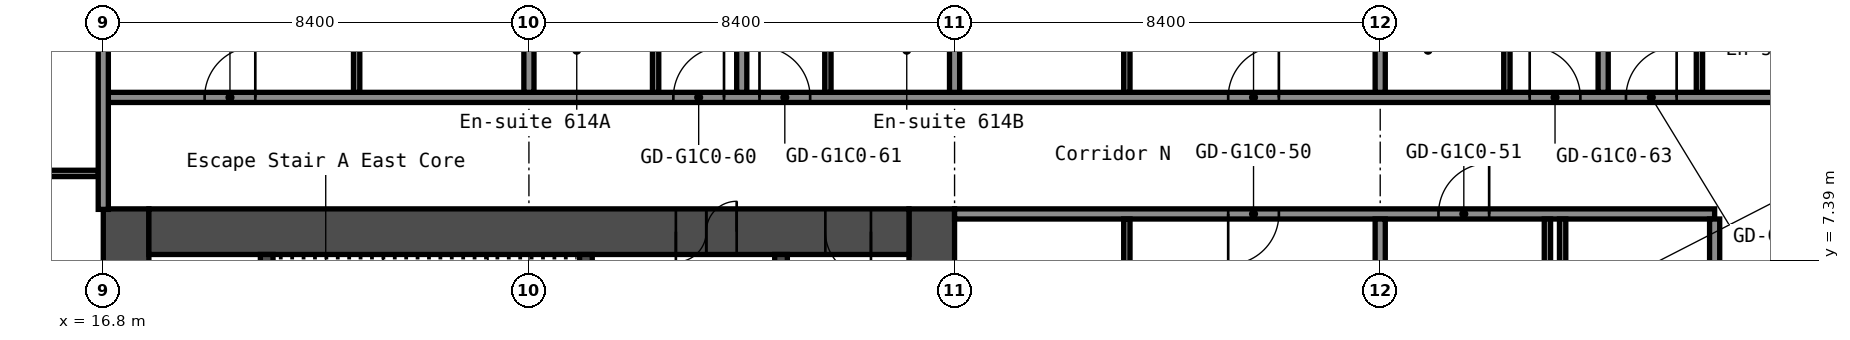
"""IFC4 building model, lengths in metres.
Left out: names, types, materials, properties, quantities, classifications, styles, units other than length and angle.
Written with IfcOpenShell. Run it as: python <this file> out.ifc"""

import sys

from ifc_helpers import new_model, si_unit, direction, frame, frame_2d, origin, place, context, subcontext, project, spatial, rectangle, extrude, element, fill, save


model = new_model("IFC4")
c1 = context("Model", 3, precision=1e-05, world=origin(), true_north=direction((0.0, 1.0)))
c2 = subcontext(c1, "Body", "Model", "MODEL_VIEW")
j1 = project(units=[si_unit("LENGTHUNIT", "METRE"), si_unit("PLANEANGLEUNIT", "RADIAN")], contexts=[c1])
p1 = place(None, origin())
s1 = spatial("IfcSite", under=j1, at=p1, CompositionType="ELEMENT")
p2 = place(p1, origin())
s2 = spatial("IfcBuilding", under=s1, at=p2, CompositionType="ELEMENT")
p3 = place(p2, frame((0.0, 0.0, 26.2)))
s3 = spatial("IfcBuildingStorey", under=s2, at=p3, CompositionType="ELEMENT", Elevation=26.2)
p4 = place(p3, frame((17.25, -8.4, 0.0), z_axis=(0.0, 0.0, 1.0), x_axis=(0.0, 1.0, 0.0)))
e1 = element("IfcWall", 1, at=p4, inside=s3, PredefinedType="SHEAR", context=c2, shape_type="SweptSolid", body=[
    extrude(rectangle(XDim=16.8, YDim=0.9, at=frame_2d((8.4, 0.0))), origin(), (0.0, 0.0, 1.0), 2.8),
])
p5 = place(p4, frame((12.75, 0.0, 0.0)))
e2 = element("IfcOpeningElement", 2, at=p5, cuts=e1, PredefinedType="OPENING", context=c2, shape_type="SweptSolid", body=[
    extrude(rectangle(XDim=1.2, YDim=2.1, at=frame_2d((0.6, 1.05))), frame((0.0, 0.46, 0.0), z_axis=(0.0, -1.0, 0.0), x_axis=(1.0, 0.0, 0.0)), (0.0, 0.0, 1.0), 0.92),
])
p6 = place(p4, frame((2.85, 0.0, 0.0)))
e3 = element("IfcOpeningElement", 3, at=p6, cuts=e1, PredefinedType="OPENING", context=c2, shape_type="SweptSolid", body=[
    extrude(rectangle(XDim=1.2, YDim=2.1, at=frame_2d((0.6, 1.05))), frame((0.0, 0.46, 0.0), z_axis=(0.0, -1.0, 0.0), x_axis=(1.0, 0.0, 0.0)), (0.0, 0.0, 1.0), 0.92),
])
p7 = place(p3, frame((33.15, -8.4, 0.0), z_axis=(0.0, 0.0, 1.0), x_axis=(0.0, 1.0, 0.0)))
e4 = element("IfcWall", 4, at=p7, inside=s3, PredefinedType="SHEAR", context=c2, shape_type="SweptSolid", body=[
    extrude(rectangle(XDim=16.8, YDim=0.9, at=frame_2d((8.4, 0.0))), origin(), (0.0, 0.0, 1.0), 2.8),
])
p8 = place(p3, frame((17.7, 7.95, 0.0), z_axis=(0.0, 0.0, 1.0), x_axis=(1.0, 0.0, 0.0)))
e5 = element("IfcWall", 5, at=p8, inside=s3, PredefinedType="SHEAR", context=c2, shape_type="SweptSolid", body=[
    extrude(rectangle(XDim=15.0, YDim=0.9, at=frame_2d((7.5, 0.0))), origin(), (0.0, 0.0, 1.0), 2.8),
])
p9 = place(p8, frame((10.4, 0.0, 0.0)))
e6 = element("IfcOpeningElement", 6, at=p9, cuts=e5, PredefinedType="OPENING", context=c2, shape_type="SweptSolid", body=[
    extrude(rectangle(XDim=1.2, YDim=2.1, at=frame_2d((0.6, 1.05))), frame((0.0, 0.46, 0.0), z_axis=(0.0, -1.0, 0.0), x_axis=(1.0, 0.0, 0.0)), (0.0, 0.0, 1.0), 0.92),
])
p10 = place(p8, frame((13.35, 0.0, 0.0)))
e7 = element("IfcOpeningElement", 7, at=p10, cuts=e5, PredefinedType="OPENING", context=c2, shape_type="SweptSolid", body=[
    extrude(rectangle(XDim=0.9, YDim=2.1, at=frame_2d((0.45, 1.05))), frame((0.0, 0.46, 0.0), z_axis=(0.0, -1.0, 0.0), x_axis=(1.0, 0.0, 0.0)), (0.0, 0.0, 1.0), 0.92),
])
p11 = place(p3, frame((20.025, 1.2, 0.0), z_axis=(0.0, 0.0, 1.0), x_axis=(0.0, 1.0, 0.0)))
e8 = element("IfcWall", 8, at=p11, inside=s3, PredefinedType="SHEAR", context=c2, shape_type="SweptSolid", body=[
    extrude(rectangle(XDim=6.3, YDim=0.25, at=frame_2d((3.15, 0.0))), origin(), (0.0, 0.0, 1.0), 2.8),
])
p12 = place(p3, frame((26.325, 3.75, 0.0), z_axis=(0.0, 0.0, 1.0), x_axis=(0.0, 1.0, 0.0)))
e9 = element("IfcWall", 9, at=p12, inside=s3, PredefinedType="SHEAR", context=c2, shape_type="SweptSolid", body=[
    extrude(rectangle(XDim=3.75, YDim=0.25, at=frame_2d((1.875, 0.0))), origin(), (0.0, 0.0, 1.0), 2.8),
])
p13 = place(p12, frame((1.25, 0.0, 0.0)))
e10 = element("IfcOpeningElement", 10, at=p13, cuts=e9, PredefinedType="OPENING", context=c2, shape_type="SweptSolid", body=[
    extrude(rectangle(XDim=1.2, YDim=2.1, at=frame_2d((0.6, 1.05))), frame((0.0, 0.135, 0.0), z_axis=(0.0, -1.0, 0.0), x_axis=(1.0, 0.0, 0.0)), (0.0, 0.0, 1.0), 0.27),
])
p14 = place(p3, frame((30.175, 1.45, 0.0), z_axis=(0.0, 0.0, 1.0), x_axis=(0.0, 1.0, 0.0)))
e11 = element("IfcWall", 11, at=p14, inside=s3, PredefinedType="SHEAR", context=c2, shape_type="SweptSolid", body=[
    extrude(rectangle(XDim=6.05, YDim=0.25, at=frame_2d((3.025, 0.0))), origin(), (0.0, 0.0, 1.0), 2.8),
])
p15 = place(p14, frame((2.625, 0.0, 0.0)))
e12 = element("IfcOpeningElement", 12, at=p15, cuts=e11, PredefinedType="OPENING", context=c2, shape_type="SweptSolid", body=[
    extrude(rectangle(XDim=1.1, YDim=2.1, at=frame_2d((0.55, 1.05))), frame((0.0, 0.135, 0.0), z_axis=(0.0, -1.0, 0.0), x_axis=(1.0, 0.0, 0.0)), (0.0, 0.0, 1.0), 0.27),
])
p16 = place(p3, frame((33.6, 8.3, 0.0), z_axis=(0.0, 0.0, 1.0), x_axis=(1.0, 0.0, 0.0)))
e13 = element("IfcWall", 13, at=p16, inside=s3, PredefinedType="PARTITIONING", context=c2, shape_type="SweptSolid", body=[
    extrude(rectangle(XDim=15.0, YDim=0.2, at=frame_2d((7.5, 0.0))), origin(), (0.0, 0.0, 1.0), 2.8),
])
p17 = place(p16, frame((5.4, 0.0, 0.0)))
e14 = element("IfcOpeningElement", 14, at=p17, cuts=e13, PredefinedType="OPENING", context=c2, shape_type="SweptSolid", body=[
    extrude(rectangle(XDim=1.0, YDim=2.1, at=frame_2d((0.5, 1.05))), frame((0.0, 0.11, 0.0), z_axis=(0.0, -1.0, 0.0), x_axis=(1.0, 0.0, 0.0)), (0.0, 0.0, 1.0), 0.22),
])
p18 = place(p16, frame((9.55, 0.0, 0.0)))
e15 = element("IfcOpeningElement", 15, at=p18, cuts=e13, PredefinedType="OPENING", context=c2, shape_type="SweptSolid", body=[
    extrude(rectangle(XDim=1.0, YDim=2.1, at=frame_2d((0.5, 1.05))), frame((0.0, 0.11, 0.0), z_axis=(0.0, -1.0, 0.0), x_axis=(1.0, 0.0, 0.0)), (0.0, 0.0, 1.0), 0.22),
])
p19 = place(p3, frame((14.363, 9.1, 0.0), z_axis=(0.0, 0.0, 1.0), x_axis=(1.0, 0.0, 0.0)))
e16 = element("IfcWall", 16, at=p19, inside=s3, PredefinedType="PARTITIONING", context=c2, shape_type="SweptSolid", body=[
    extrude(rectangle(XDim=2.337, YDim=0.125, at=frame_2d((1.169, 0.0))), origin(), (0.0, 0.0, 1.0), 2.8),
])
p20 = place(p3, frame((16.8, 10.6, 0.0), z_axis=(0.0, 0.0, 1.0), x_axis=(1.0, 0.0, 0.0)))
e17 = element("IfcWall", 17, at=p20, inside=s3, PredefinedType="PARTITIONING", context=c2, shape_type="SweptSolid", body=[
    extrude(rectangle(XDim=34.3, YDim=0.2, at=frame_2d((17.15, 0.0))), origin(), (0.0, 0.0, 1.0), 2.8),
])
p21 = place(p20, frame((2.0, 0.0, 0.0)))
e18 = element("IfcOpeningElement", 18, at=p21, cuts=e17, PredefinedType="OPENING", context=c2, shape_type="SweptSolid", body=[
    extrude(rectangle(XDim=1.0, YDim=2.1, at=frame_2d((0.5, 1.05))), frame((0.0, 0.11, 0.0), z_axis=(0.0, -1.0, 0.0), x_axis=(1.0, 0.0, 0.0)), (0.0, 0.0, 1.0), 0.22),
])
p22 = place(p20, frame((11.25, 0.0, 0.0)))
e19 = element("IfcOpeningElement", 19, at=p22, cuts=e17, PredefinedType="OPENING", context=c2, shape_type="SweptSolid", body=[
    extrude(rectangle(XDim=1.0, YDim=2.1, at=frame_2d((0.5, 1.05))), frame((0.0, 0.11, 0.0), z_axis=(0.0, -1.0, 0.0), x_axis=(1.0, 0.0, 0.0)), (0.0, 0.0, 1.0), 0.22),
])
p23 = place(p20, frame((12.95, 0.0, 0.0)))
e20 = element("IfcOpeningElement", 20, at=p23, cuts=e17, PredefinedType="OPENING", context=c2, shape_type="SweptSolid", body=[
    extrude(rectangle(XDim=1.0, YDim=2.1, at=frame_2d((0.5, 1.05))), frame((0.0, 0.11, 0.0), z_axis=(0.0, -1.0, 0.0), x_axis=(1.0, 0.0, 0.0)), (0.0, 0.0, 1.0), 0.22),
])
p24 = place(p20, frame((22.2, 0.0, 0.0)))
e21 = element("IfcOpeningElement", 21, at=p24, cuts=e17, PredefinedType="OPENING", context=c2, shape_type="SweptSolid", body=[
    extrude(rectangle(XDim=1.0, YDim=2.1, at=frame_2d((0.5, 1.05))), frame((0.0, 0.11, 0.0), z_axis=(0.0, -1.0, 0.0), x_axis=(1.0, 0.0, 0.0)), (0.0, 0.0, 1.0), 0.22),
])
p25 = place(p20, frame((28.15, 0.0, 0.0)))
e22 = element("IfcOpeningElement", 22, at=p25, cuts=e17, PredefinedType="OPENING", context=c2, shape_type="SweptSolid", body=[
    extrude(rectangle(XDim=1.0, YDim=2.1, at=frame_2d((0.5, 1.05))), frame((0.0, 0.11, 0.0), z_axis=(0.0, -1.0, 0.0), x_axis=(1.0, 0.0, 0.0)), (0.0, 0.0, 1.0), 0.22),
])
p26 = place(p20, frame((30.05, 0.0, 0.0)))
e23 = element("IfcOpeningElement", 23, at=p26, cuts=e17, PredefinedType="OPENING", context=c2, shape_type="SweptSolid", body=[
    extrude(rectangle(XDim=1.0, YDim=2.1, at=frame_2d((0.5, 1.05))), frame((0.0, 0.11, 0.0), z_axis=(0.0, -1.0, 0.0), x_axis=(1.0, 0.0, 0.0)), (0.0, 0.0, 1.0), 0.22),
])
p27 = place(p3, frame((16.8, 8.39, 0.0), z_axis=(0.0, 0.0, 1.0), x_axis=(0.0, 1.0, 0.0)))
e24 = element("IfcWall", 24, at=p27, inside=s3, PredefinedType="PARTITIONING", context=c2, shape_type="SweptSolid", body=[
    extrude(rectangle(XDim=11.91, YDim=0.2, at=frame_2d((5.955, 0.0))), origin(), (0.0, 0.0, 1.0), 2.8),
])
p28 = place(p3, frame((21.8, 10.7, 0.0), z_axis=(0.0, 0.0, 1.0), x_axis=(0.0, 1.0, 0.0)))
e25 = element("IfcWall", 25, at=p28, inside=s3, PredefinedType="PARTITIONING", context=c2, shape_type="SweptSolid", body=[
    extrude(rectangle(XDim=3.3, YDim=0.125, at=frame_2d((1.65, 0.0))), origin(), (0.0, 0.0, 1.0), 2.8),
])
p29 = place(p3, frame((25.2, 10.7, 0.0), z_axis=(0.0, 0.0, 1.0), x_axis=(0.0, 1.0, 0.0)))
e26 = element("IfcWall", 26, at=p29, inside=s3, PredefinedType="PARTITIONING", context=c2, shape_type="SweptSolid", body=[
    extrude(rectangle(XDim=9.6, YDim=0.2, at=frame_2d((4.8, 0.0))), origin(), (0.0, 0.0, 1.0), 2.8),
])
p30 = place(p3, frame((27.7, 10.7, 0.0), z_axis=(0.0, 0.0, 1.0), x_axis=(0.0, 1.0, 0.0)))
e27 = element("IfcWall", 27, at=p30, inside=s3, PredefinedType="PARTITIONING", context=c2, shape_type="SweptSolid", body=[
    extrude(rectangle(XDim=2.9, YDim=0.125, at=frame_2d((1.45, 0.0))), origin(), (0.0, 0.0, 1.0), 2.8),
])
p31 = place(p30, frame((1.5, 0.0, 0.0)))
e28 = element("IfcOpeningElement", 28, at=p31, cuts=e27, PredefinedType="OPENING", context=c2, shape_type="SweptSolid", body=[
    extrude(rectangle(XDim=0.8, YDim=2.1, at=frame_2d((0.4, 1.05))), frame((0.0, 0.073, 0.0), z_axis=(0.0, -1.0, 0.0), x_axis=(1.0, 0.0, 0.0)), (0.0, 0.0, 1.0), 0.145),
])
p32 = place(p3, frame((29.4, 10.7, 0.0), z_axis=(0.0, 0.0, 1.0), x_axis=(0.0, 1.0, 0.0)))
e29 = element("IfcWall", 29, at=p32, inside=s3, PredefinedType="PARTITIONING", context=c2, shape_type="SweptSolid", body=[
    extrude(rectangle(XDim=9.6, YDim=0.2, at=frame_2d((4.8, 0.0))), origin(), (0.0, 0.0, 1.0), 2.8),
])
p33 = place(p3, frame((31.1, 10.7, 0.0), z_axis=(0.0, 0.0, 1.0), x_axis=(0.0, 1.0, 0.0)))
e30 = element("IfcWall", 30, at=p33, inside=s3, PredefinedType="PARTITIONING", context=c2, shape_type="SweptSolid", body=[
    extrude(rectangle(XDim=2.9, YDim=0.125, at=frame_2d((1.45, 0.0))), origin(), (0.0, 0.0, 1.0), 2.8),
])
p34 = place(p33, frame((1.5, 0.0, 0.0)))
e31 = element("IfcOpeningElement", 31, at=p34, cuts=e30, PredefinedType="OPENING", context=c2, shape_type="SweptSolid", body=[
    extrude(rectangle(XDim=0.8, YDim=2.1, at=frame_2d((0.4, 1.05))), frame((0.0, 0.073, 0.0), z_axis=(0.0, -1.0, 0.0), x_axis=(1.0, 0.0, 0.0)), (0.0, 0.0, 1.0), 0.145),
])
p35 = place(p3, frame((33.6, 10.7, 0.0), z_axis=(0.0, 0.0, 1.0), x_axis=(0.0, 1.0, 0.0)))
e32 = element("IfcWall", 32, at=p35, inside=s3, PredefinedType="PARTITIONING", context=c2, shape_type="SweptSolid", body=[
    extrude(rectangle(XDim=9.6, YDim=0.2, at=frame_2d((4.8, 0.0))), origin(), (0.0, 0.0, 1.0), 2.8),
])
for number, where, z_axis, x_axis in (
    (33, (37.0, 4.9, 0.0), (0.0, 0.0, 1.0), (0.0, 1.0, 0.0)),
    (34, (37.0, 10.7, 0.0), (0.0, 0.0, 1.0), (0.0, 1.0, 0.0)),
):
    element("IfcWall", number, at=place(p3, frame(where, z_axis=z_axis, x_axis=x_axis)), inside=s3, PredefinedType="PARTITIONING", context=c2, shape_type="SweptSolid", body=[
        extrude(rectangle(XDim=3.3, YDim=0.125, at=frame_2d((1.65, 0.0))), origin(), (0.0, 0.0, 1.0), 2.8),
    ])
p36 = place(p3, frame((42.0, -8.2, 0.0), z_axis=(0.0, 0.0, 1.0), x_axis=(0.0, 1.0, 0.0)))
e35 = element("IfcWall", 35, at=p36, inside=s3, PredefinedType="PARTITIONING", context=c2, shape_type="SweptSolid", body=[
    extrude(rectangle(XDim=16.4, YDim=0.2, at=frame_2d((8.2, 0.0))), origin(), (0.0, 0.0, 1.0), 2.8),
])
p37 = place(p3, frame((42.0, 10.7, 0.0), z_axis=(0.0, 0.0, 1.0), x_axis=(0.0, 1.0, 0.0)))
e36 = element("IfcWall", 36, at=p37, inside=s3, PredefinedType="PARTITIONING", context=c2, shape_type="SweptSolid", body=[
    extrude(rectangle(XDim=9.6, YDim=0.2, at=frame_2d((4.8, 0.0))), origin(), (0.0, 0.0, 1.0), 2.8),
])
p38 = place(p3, frame((44.5, 10.7, 0.0), z_axis=(0.0, 0.0, 1.0), x_axis=(0.0, 1.0, 0.0)))
e37 = element("IfcWall", 37, at=p38, inside=s3, PredefinedType="PARTITIONING", context=c2, shape_type="SweptSolid", body=[
    extrude(rectangle(XDim=2.9, YDim=0.125, at=frame_2d((1.45, 0.0))), origin(), (0.0, 0.0, 1.0), 2.8),
])
p39 = place(p38, frame((1.5, 0.0, 0.0)))
e38 = element("IfcOpeningElement", 38, at=p39, cuts=e37, PredefinedType="OPENING", context=c2, shape_type="SweptSolid", body=[
    extrude(rectangle(XDim=0.8, YDim=2.1, at=frame_2d((0.4, 1.05))), frame((0.0, 0.073, 0.0), z_axis=(0.0, -1.0, 0.0), x_axis=(1.0, 0.0, 0.0)), (0.0, 0.0, 1.0), 0.145),
])
p40 = place(p3, frame((45.3, -8.2, 0.0), z_axis=(0.0, 0.0, 1.0), x_axis=(0.0, 1.0, 0.0)))
e39 = element("IfcWall", 39, at=p40, inside=s3, PredefinedType="PARTITIONING", context=c2, shape_type="SweptSolid", body=[
    extrude(rectangle(XDim=16.4, YDim=0.125, at=frame_2d((8.2, 0.0))), origin(), (0.0, 0.0, 1.0), 2.8),
])
p41 = place(p40, frame((4.05, 0.0, 0.0)))
e40 = element("IfcOpeningElement", 40, at=p41, cuts=e39, PredefinedType="OPENING", context=c2, shape_type="SweptSolid", body=[
    extrude(rectangle(XDim=0.9, YDim=2.1, at=frame_2d((0.45, 1.05))), frame((0.0, 0.073, 0.0), z_axis=(0.0, -1.0, 0.0), x_axis=(1.0, 0.0, 0.0)), (0.0, 0.0, 1.0), 0.145),
])
p42 = place(p40, frame((11.45, 0.0, 0.0)))
e41 = element("IfcOpeningElement", 41, at=p42, cuts=e39, PredefinedType="OPENING", context=c2, shape_type="SweptSolid", body=[
    extrude(rectangle(XDim=0.9, YDim=2.1, at=frame_2d((0.45, 1.05))), frame((0.0, 0.073, 0.0), z_axis=(0.0, -1.0, 0.0), x_axis=(1.0, 0.0, 0.0)), (0.0, 0.0, 1.0), 0.145),
])
p43 = place(p3, frame((45.6, 5.1, 0.0), z_axis=(0.0, 0.0, 1.0), x_axis=(0.0, 1.0, 0.0)))
e42 = element("IfcWall", 42, at=p43, inside=s3, PredefinedType="PARTITIONING", context=c2, shape_type="SweptSolid", body=[
    extrude(rectangle(XDim=3.1, YDim=0.125, at=frame_2d((1.55, 0.0))), origin(), (0.0, 0.0, 1.0), 2.8),
])
p44 = place(p3, frame((46.4, 10.7, 0.0), z_axis=(0.0, 0.0, 1.0), x_axis=(0.0, 1.0, 0.0)))
e43 = element("IfcWall", 43, at=p44, inside=s3, PredefinedType="PARTITIONING", context=c2, shape_type="SweptSolid", body=[
    extrude(rectangle(XDim=9.6, YDim=0.2, at=frame_2d((4.8, 0.0))), origin(), (0.0, 0.0, 1.0), 2.8),
])
p45 = place(p3, frame((48.3, 10.7, 0.0), z_axis=(0.0, 0.0, 1.0), x_axis=(0.0, 1.0, 0.0)))
e44 = element("IfcWall", 44, at=p45, inside=s3, PredefinedType="PARTITIONING", context=c2, shape_type="SweptSolid", body=[
    extrude(rectangle(XDim=2.9, YDim=0.125, at=frame_2d((1.45, 0.0))), origin(), (0.0, 0.0, 1.0), 2.8),
])
p46 = place(p45, frame((1.5, 0.0, 0.0)))
e45 = element("IfcOpeningElement", 45, at=p46, cuts=e44, PredefinedType="OPENING", context=c2, shape_type="SweptSolid", body=[
    extrude(rectangle(XDim=0.8, YDim=2.1, at=frame_2d((0.4, 1.05))), frame((0.0, 0.073, 0.0), z_axis=(0.0, -1.0, 0.0), x_axis=(1.0, 0.0, 0.0)), (0.0, 0.0, 1.0), 0.145),
])
p47 = place(p3, frame((48.6, -8.2, 0.0), z_axis=(0.0, 0.0, 1.0), x_axis=(0.0, 1.0, 0.0)))
e46 = element("IfcWall", 46, at=p47, inside=s3, PredefinedType="PARTITIONING", context=c2, shape_type="SweptSolid", body=[
    extrude(rectangle(XDim=16.4, YDim=0.2, at=frame_2d((8.2, 0.0))), origin(), (0.0, 0.0, 1.0), 2.8),
])
p48 = place(p9, origin())
e47 = element("IfcDoor", 47, at=p48, inside=s3, OperationType="DOUBLE_DOOR_SINGLE_SWING", PredefinedType="DOOR", context=c2, shape_type="SweptSolid", body=[
    extrude(rectangle(XDim=1.2, YDim=2.1, at=frame_2d((0.6, 1.05))), frame((0.0, 0.025, 0.0), z_axis=(0.0, -1.0, 0.0), x_axis=(1.0, 0.0, 0.0)), (0.0, 0.0, 1.0), 0.05),
])
fill(e6, e47)
p49 = place(p10, origin())
e48 = element("IfcDoor", 48, at=p49, inside=s3, OperationType="SINGLE_SWING_RIGHT", PredefinedType="DOOR", context=c2, shape_type="SweptSolid", body=[
    extrude(rectangle(XDim=0.9, YDim=2.1, at=frame_2d((0.45, 1.05))), frame((0.0, 0.025, 0.0), z_axis=(0.0, -1.0, 0.0), x_axis=(1.0, 0.0, 0.0)), (0.0, 0.0, 1.0), 0.05),
])
fill(e7, e48)
p50 = place(p17, origin())
e49 = element("IfcDoor", 49, at=p50, inside=s3, OperationType="SINGLE_SWING_LEFT", PredefinedType="DOOR", context=c2, shape_type="SweptSolid", body=[
    extrude(rectangle(XDim=1.0, YDim=2.1, at=frame_2d((0.5, 1.05))), frame((0.0, 0.025, 0.0), z_axis=(0.0, -1.0, 0.0), x_axis=(1.0, 0.0, 0.0)), (0.0, 0.0, 1.0), 0.05),
])
fill(e14, e49)
p51 = place(p18, origin())
e50 = element("IfcDoor", 50, at=p51, inside=s3, OperationType="SINGLE_SWING_LEFT", PredefinedType="DOOR", context=c2, shape_type="SweptSolid", body=[
    extrude(rectangle(XDim=1.0, YDim=2.1, at=frame_2d((0.5, 1.05))), frame((0.0, 0.025, 0.0), z_axis=(0.0, -1.0, 0.0), x_axis=(1.0, 0.0, 0.0)), (0.0, 0.0, 1.0), 0.05),
])
fill(e15, e50)
p52 = place(p21, origin())
e51 = element("IfcDoor", 51, at=p52, inside=s3, OperationType="SINGLE_SWING_LEFT", PredefinedType="DOOR", context=c2, shape_type="SweptSolid", body=[
    extrude(rectangle(XDim=1.0, YDim=2.1, at=frame_2d((0.5, 1.05))), frame((0.0, 0.025, 0.0), z_axis=(0.0, -1.0, 0.0), x_axis=(1.0, 0.0, 0.0)), (0.0, 0.0, 1.0), 0.05),
])
fill(e18, e51)
p53 = place(p22, origin())
e52 = element("IfcDoor", 52, at=p53, inside=s3, OperationType="SINGLE_SWING_LEFT", PredefinedType="DOOR", context=c2, shape_type="SweptSolid", body=[
    extrude(rectangle(XDim=1.0, YDim=2.1, at=frame_2d((0.5, 1.05))), frame((0.0, 0.025, 0.0), z_axis=(0.0, -1.0, 0.0), x_axis=(1.0, 0.0, 0.0)), (0.0, 0.0, 1.0), 0.05),
])
fill(e19, e52)
p54 = place(p23, origin())
e53 = element("IfcDoor", 53, at=p54, inside=s3, OperationType="SINGLE_SWING_RIGHT", PredefinedType="DOOR", context=c2, shape_type="SweptSolid", body=[
    extrude(rectangle(XDim=1.0, YDim=2.1, at=frame_2d((0.5, 1.05))), frame((0.0, 0.025, 0.0), z_axis=(0.0, -1.0, 0.0), x_axis=(1.0, 0.0, 0.0)), (0.0, 0.0, 1.0), 0.05),
])
fill(e20, e53)
p55 = place(p24, origin())
e54 = element("IfcDoor", 54, at=p55, inside=s3, OperationType="SINGLE_SWING_LEFT", PredefinedType="DOOR", context=c2, shape_type="SweptSolid", body=[
    extrude(rectangle(XDim=1.0, YDim=2.1, at=frame_2d((0.5, 1.05))), frame((0.0, 0.025, 0.0), z_axis=(0.0, -1.0, 0.0), x_axis=(1.0, 0.0, 0.0)), (0.0, 0.0, 1.0), 0.05),
])
fill(e21, e54)
p56 = place(p25, origin())
e55 = element("IfcDoor", 55, at=p56, inside=s3, OperationType="SINGLE_SWING_RIGHT", PredefinedType="DOOR", context=c2, shape_type="SweptSolid", body=[
    extrude(rectangle(XDim=1.0, YDim=2.1, at=frame_2d((0.5, 1.05))), frame((0.0, 0.025, 0.0), z_axis=(0.0, -1.0, 0.0), x_axis=(1.0, 0.0, 0.0)), (0.0, 0.0, 1.0), 0.05),
])
fill(e22, e55)
p57 = place(p26, origin())
e56 = element("IfcDoor", 56, at=p57, inside=s3, OperationType="SINGLE_SWING_LEFT", PredefinedType="DOOR", context=c2, shape_type="SweptSolid", body=[
    extrude(rectangle(XDim=1.0, YDim=2.1, at=frame_2d((0.5, 1.05))), frame((0.0, 0.025, 0.0), z_axis=(0.0, -1.0, 0.0), x_axis=(1.0, 0.0, 0.0)), (0.0, 0.0, 1.0), 0.05),
])
fill(e23, e56)
save(model, sys.argv[1])
